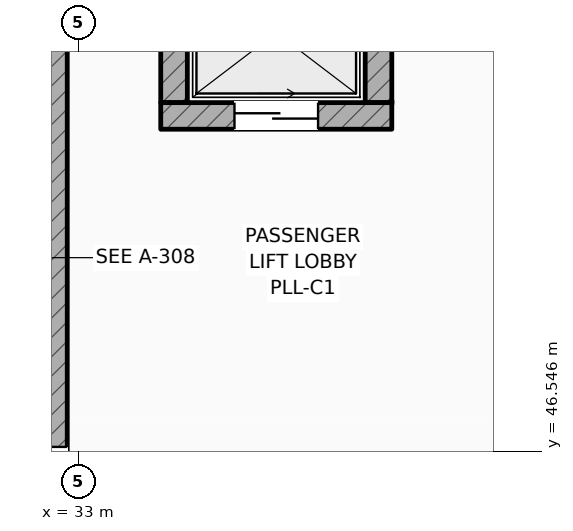
"""IFC4 building model, lengths in metres.
Left out: names, types, materials, properties, quantities, classifications, styles, units other than length and angle.
Written with IfcOpenShell. Run it as: python <this file> out.ifc"""

import sys

from ifc_helpers import new_model, si_unit, direction, frame, frame_2d, origin, place, context, subcontext, project, spatial, rectangle, extrude, element, fill, save


model = new_model("IFC4")
c1 = context("Model", 3, precision=1e-05, world=origin(), true_north=direction((0.0, 1.0)))
c2 = subcontext(c1, "Body", "Model", "MODEL_VIEW")
j1 = project(units=[si_unit("LENGTHUNIT", "METRE"), si_unit("PLANEANGLEUNIT", "RADIAN")], contexts=[c1])
p1 = place(None, origin())
s1 = spatial("IfcSite", under=j1, at=p1, CompositionType="ELEMENT")
p2 = place(p1, origin())
s2 = spatial("IfcBuilding", under=s1, at=p2, CompositionType="ELEMENT")
p3 = place(p2, frame((0.0, 0.0, 6.0)))
s3 = spatial("IfcBuildingStorey", under=s2, at=p3, CompositionType="ELEMENT", Elevation=6.0)
p4 = place(p3, frame((32.675, 44.75, 0.0), z_axis=(0.0, 0.0, 1.0), x_axis=(0.0, 1.0, 0.0)))
e1 = element("IfcWall", 1, at=p4, inside=s3, PredefinedType="SHEAR", context=c2, shape_type="SweptSolid", body=[
    extrude(rectangle(XDim=8.68, YDim=0.35, at=frame_2d((4.34, 0.0))), origin(), (0.0, 0.0, 1.0), 5.4),
])
p5 = place(p4, frame((0.25, 0.0, 0.0)))
e2 = element("IfcOpeningElement", 2, at=p5, cuts=e1, PredefinedType="OPENING", context=c2, shape_type="SweptSolid", body=[
    extrude(rectangle(XDim=1.6, YDim=2.2, at=frame_2d((0.8, 1.1))), frame((0.0, 0.185, 0.0), z_axis=(0.0, -1.0, 0.0), x_axis=(1.0, 0.0, 0.0)), (0.0, 0.0, 1.0), 0.37),
])
p6 = place(p3, frame((34.08, 50.955, 0.0), z_axis=(0.0, 0.0, 1.0), x_axis=(1.0, 0.0, 0.0)))
e3 = element("IfcWall", 3, at=p6, inside=s3, PredefinedType="SHEAR", context=c2, shape_type="SweptSolid", body=[
    extrude(rectangle(XDim=3.04, YDim=0.35, at=frame_2d((1.52, 0.0))), origin(), (0.0, 0.0, 1.0), 5.05),
])
p7 = place(p6, frame((0.97, 0.0, 0.0)))
e4 = element("IfcOpeningElement", 4, at=p7, cuts=e3, PredefinedType="OPENING", context=c2, shape_type="SweptSolid", body=[
    extrude(rectangle(XDim=1.1, YDim=2.2, at=frame_2d((0.55, 1.1))), frame((0.0, 0.185, 0.0), z_axis=(0.0, -1.0, 0.0), x_axis=(1.0, 0.0, 0.0)), (0.0, 0.0, 1.0), 0.37),
])
for number, where, z_axis, x_axis in (
    (5, (34.255, 51.13, 0.0), (0.0, 0.0, 1.0), (0.0, 1.0, 0.0)),
    (6, (36.945, 51.13, 0.0), (0.0, 0.0, 1.0), (0.0, 1.0, 0.0)),
):
    element("IfcWall", number, at=place(p3, frame(where, z_axis=z_axis, x_axis=x_axis)), inside=s3, PredefinedType="SHEAR", context=c2, shape_type="SweptSolid", body=[
        extrude(rectangle(XDim=1.84, YDim=0.35, at=frame_2d((0.92, 0.0))), origin(), (0.0, 0.0, 1.0), 5.05),
    ])
p8 = place(p5, origin())
e7 = element("IfcDoor", 7, at=p8, inside=s3, OperationType="SINGLE_SWING_LEFT", PredefinedType="DOOR", context=c2, shape_type="SweptSolid", body=[
    extrude(rectangle(XDim=1.6, YDim=2.2, at=frame_2d((0.8, 1.1))), frame((0.0, 0.025, 0.0), z_axis=(0.0, -1.0, 0.0), x_axis=(1.0, 0.0, 0.0)), (0.0, 0.0, 1.0), 0.05),
])
fill(e2, e7)
p9 = place(p7, origin())
e8 = element("IfcDoor", 8, at=p9, inside=s3, OperationType="SLIDING_TO_LEFT", PredefinedType="DOOR", context=c2, shape_type="SweptSolid", body=[
    extrude(rectangle(XDim=1.1, YDim=2.2, at=frame_2d((0.55, 1.1))), frame((0.0, 0.025, 0.0), z_axis=(0.0, -1.0, 0.0), x_axis=(1.0, 0.0, 0.0)), (0.0, 0.0, 1.0), 0.05),
])
fill(e4, e8)
save(model, sys.argv[1])
